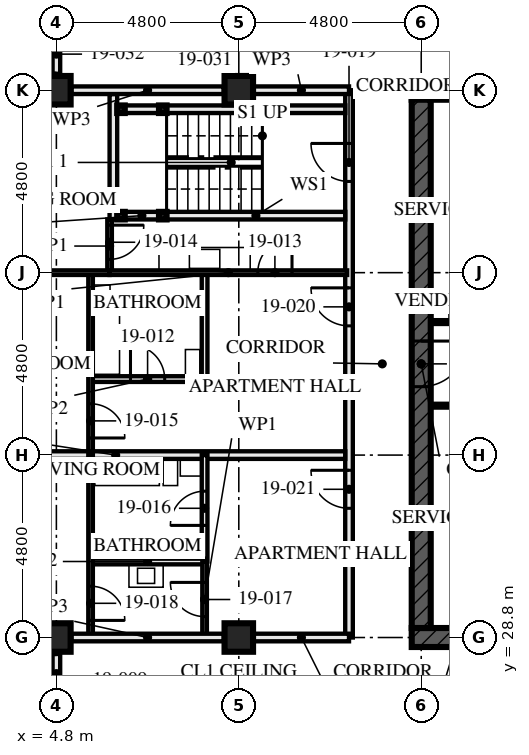
"""IFC4 building model, lengths in metres.
Left out: names, types, materials, properties, quantities, classifications, styles, units other than length and angle.
Written with IfcOpenShell. Run it as: python <this file> out.ifc"""

import sys

from ifc_helpers import new_model, si_unit, direction, frame, frame_2d, origin, origin_2d, place, context, subcontext, project, spatial, rectangle, hollow_rectangle, extrude, element, fill, save


model = new_model("IFC4")
c1 = context("Model", 3, precision=1e-05, world=origin(), true_north=direction((0.0, 1.0)))
c2 = subcontext(c1, "Body", "Model", "MODEL_VIEW")
j1 = project(units=[si_unit("LENGTHUNIT", "METRE"), si_unit("PLANEANGLEUNIT", "RADIAN")], contexts=[c1])
p1 = place(None, origin())
s1 = spatial("IfcSite", under=j1, at=p1, CompositionType="ELEMENT")
p2 = place(p1, origin())
s2 = spatial("IfcBuilding", under=s1, at=p2, CompositionType="ELEMENT")
p3 = place(p2, frame((0.0, 0.0, 72.5)))
s3 = spatial("IfcBuildingStorey", under=s2, at=p3, CompositionType="ELEMENT", Elevation=72.5)
for number, where, z_axis, x_axis in (
    (1, (4.8, 28.8, 0.0), (0.0, 0.0, 1.0), (0.0, 1.0, 0.0)),
    (2, (4.8, 43.2, 0.0), (0.0, 0.0, 1.0), (0.0, 1.0, 0.0)),
    (3, (9.6, 28.8, 0.0), (0.0, 0.0, 1.0), (0.0, 1.0, 0.0)),
    (4, (9.6, 43.2, 0.0), (0.0, 0.0, 1.0), (0.0, 1.0, 0.0)),
):
    element("IfcColumn", number, at=place(p3, frame(where, z_axis=z_axis, x_axis=x_axis)), inside=s3, PredefinedType="COLUMN", context=c2, shape_type="SweptSolid", body=[
        extrude(hollow_rectangle(XDim=0.75, YDim=0.75, WallThickness=0.08, at=origin_2d()), origin(), (0.0, 0.0, 1.0), 3.5),
    ])
p4 = place(p3, frame((14.15, 28.8, -0.17), z_axis=(0.0, 0.0, 1.0), x_axis=(1.0, 0.0, 0.0)))
e5 = element("IfcWall", 5, at=p4, inside=s3, PredefinedType="SHEAR", context=c2, shape_type="SweptSolid", body=[
    extrude(rectangle(XDim=14.9, YDim=0.5, at=frame_2d((7.45, 0.0))), origin(), (0.0, 0.0, 1.0), 3.5),
])
p5 = place(p4, frame((6.85, 0.0, 0.17)))
e6 = element("IfcOpeningElement", 6, at=p5, cuts=e5, PredefinedType="OPENING", context=c2, shape_type="SweptSolid", body=[
    extrude(rectangle(XDim=1.2, YDim=2.1, at=frame_2d((0.6, 1.05))), frame((0.0, 0.26, 0.0), z_axis=(0.0, -1.0, 0.0), x_axis=(1.0, 0.0, 0.0)), (0.0, 0.0, 1.0), 0.521),
])
p6 = place(p3, frame((29.05, 43.2, -0.17), z_axis=(0.0, 0.0, 1.0), x_axis=(-1.0, 0.0, 0.0)))
e7 = element("IfcWall", 7, at=p6, inside=s3, PredefinedType="SHEAR", context=c2, shape_type="SweptSolid", body=[
    extrude(rectangle(XDim=14.9, YDim=0.5, at=frame_2d((7.45, 0.0))), origin(), (0.0, 0.0, 1.0), 3.5),
])
p7 = place(p6, frame((6.85, 0.0, 0.17)))
e8 = element("IfcOpeningElement", 8, at=p7, cuts=e7, PredefinedType="OPENING", context=c2, shape_type="SweptSolid", body=[
    extrude(rectangle(XDim=1.2, YDim=2.1, at=frame_2d((0.6, 1.05))), frame((0.0, 0.26, 0.0), z_axis=(0.0, -1.0, 0.0), x_axis=(1.0, 0.0, 0.0)), (0.0, 0.0, 1.0), 0.521),
])
p8 = place(p3, frame((14.4, 42.95, -0.17), z_axis=(0.0, 0.0, 1.0), x_axis=(0.0, -1.0, 0.0)))
e9 = element("IfcWall", 9, at=p8, inside=s3, PredefinedType="SHEAR", context=c2, shape_type="SweptSolid", body=[
    extrude(rectangle(XDim=13.9, YDim=0.5, at=frame_2d((6.95, 0.0))), origin(), (0.0, 0.0, 1.0), 3.5),
])
p9 = place(p8, frame((6.35, 0.0, 0.17)))
e10 = element("IfcOpeningElement", 10, at=p9, cuts=e9, PredefinedType="OPENING", context=c2, shape_type="SweptSolid", body=[
    extrude(rectangle(XDim=1.2, YDim=2.1, at=frame_2d((0.6, 1.05))), frame((0.0, 0.26, 0.0), z_axis=(0.0, -1.0, 0.0), x_axis=(1.0, 0.0, 0.0)), (0.0, 0.0, 1.0), 0.521),
])
for number, where, z_axis, x_axis in (
    (11, (6.5, 42.7, 0.0), (0.0, 0.0, 1.0), (1.0, 0.0, 0.0)),
    (12, (6.5, 39.9, 0.0), (0.0, 0.0, 1.0), (1.0, 0.0, 0.0)),
    (13, (7.6, 42.7, 0.0), (0.0, 0.0, 1.0), (1.0, 0.0, 0.0)),
    (14, (7.6, 39.9, 0.0), (0.0, 0.0, 1.0), (1.0, 0.0, 0.0)),
):
    element("IfcColumn", number, at=place(p3, frame(where, z_axis=z_axis, x_axis=x_axis)), inside=s3, PredefinedType="COLUMN", context=c2, shape_type="SweptSolid", body=[
        extrude(hollow_rectangle(XDim=0.2, YDim=0.2, WallThickness=0.008, at=origin_2d()), origin(), (0.0, 0.0, 1.0), 3.33),
    ])
p10 = place(p3, frame((4.8, 26.8, 0.0), z_axis=(0.0, 0.0, 1.0), x_axis=(0.0, 1.0, 0.0)))
e15 = element("IfcWall", 15, at=p10, inside=s3, PredefinedType="PARTITIONING", context=c2, shape_type="SweptSolid", body=[
    extrude(rectangle(XDim=1.605, YDim=0.2, at=frame_2d((0.802, 0.0))), origin(), (0.0, 0.0, 1.0), 3.33),
])
p11 = place(p10, frame((0.55, 0.0, 0.0)))
e16 = element("IfcOpeningElement", 16, at=p11, cuts=e15, PredefinedType="OPENING", context=c2, shape_type="SweptSolid", body=[
    extrude(rectangle(XDim=1.0, YDim=2.1, at=frame_2d((0.5, 1.05))), frame((0.0, 0.111, 0.0), z_axis=(0.0, -1.0, 0.0), x_axis=(1.0, 0.0, 0.0)), (0.0, 0.0, 1.0), 0.221),
])
p12 = place(p3, frame((6.6, 42.7, 0.0), z_axis=(0.0, 0.0, 1.0), x_axis=(1.0, 0.0, 0.0)))
e17 = element("IfcWall", 17, at=p12, inside=s3, PredefinedType="SOLIDWALL", context=c2, shape_type="SweptSolid", body=[
    extrude(rectangle(XDim=0.9, YDim=0.2, at=frame_2d((0.45, 0.0))), origin(), (0.0, 0.0, 1.0), 2.99),
])
p13 = place(p3, frame((7.7, 42.7, 0.0), z_axis=(0.0, 0.0, 1.0), x_axis=(1.0, 0.0, 0.0)))
e18 = element("IfcWall", 18, at=p13, inside=s3, PredefinedType="SOLIDWALL", context=c2, shape_type="SweptSolid", body=[
    extrude(rectangle(XDim=4.7, YDim=0.2, at=frame_2d((2.35, 0.0))), origin(), (0.0, 0.0, 1.0), 2.99),
])
p14 = place(p3, frame((6.6, 39.9, 0.0), z_axis=(0.0, 0.0, 1.0), x_axis=(1.0, 0.0, 0.0)))
e19 = element("IfcWall", 19, at=p14, inside=s3, PredefinedType="SOLIDWALL", context=c2, shape_type="SweptSolid", body=[
    extrude(rectangle(XDim=0.9, YDim=0.2, at=frame_2d((0.45, 0.0))), origin(), (0.0, 0.0, 1.0), 2.99),
])
p15 = place(p3, frame((7.7, 39.9, 0.0), z_axis=(0.0, 0.0, 1.0), x_axis=(1.0, 0.0, 0.0)))
e20 = element("IfcWall", 20, at=p15, inside=s3, PredefinedType="SOLIDWALL", context=c2, shape_type="SweptSolid", body=[
    extrude(rectangle(XDim=4.7, YDim=0.2, at=frame_2d((2.35, 0.0))), origin(), (0.0, 0.0, 1.0), 2.99),
])
p16 = place(p3, frame((6.3, 43.1, 0.0), z_axis=(0.0, 0.0, 1.0), x_axis=(0.0, -1.0, 0.0)))
e21 = element("IfcWall", 21, at=p16, inside=s3, PredefinedType="SOLIDWALL", context=c2, shape_type="SweptSolid", body=[
    extrude(rectangle(XDim=3.3, YDim=0.2, at=frame_2d((1.65, 0.0))), origin(), (0.0, 0.0, 1.0), 3.33),
])
p17 = place(p3, frame((5.7, 35.6, 0.0), z_axis=(0.0, 0.0, 1.0), x_axis=(1.0, 0.0, 0.0)))
e22 = element("IfcWall", 22, at=p17, inside=s3, PredefinedType="PARTITIONING", context=c2, shape_type="SweptSolid", body=[
    extrude(rectangle(XDim=3.0, YDim=0.15, at=frame_2d((1.5, 0.0))), origin(), (0.0, 0.0, 1.0), 3.33),
])
p18 = place(p17, frame((1.05, 0.0, 0.0)))
e23 = element("IfcOpeningElement", 23, at=p18, cuts=e22, PredefinedType="OPENING", context=c2, shape_type="SweptSolid", body=[
    extrude(rectangle(XDim=0.9, YDim=2.1, at=frame_2d((0.45, 1.05))), frame((0.0, 0.085, 0.0), z_axis=(0.0, -1.0, 0.0), x_axis=(1.0, 0.0, 0.0)), (0.0, 0.0, 1.0), 0.171),
])
p19 = place(p3, frame((8.7, 38.4, 0.0), z_axis=(0.0, 0.0, 1.0), x_axis=(0.0, -1.0, 0.0)))
e24 = element("IfcWall", 24, at=p19, inside=s3, PredefinedType="PARTITIONING", context=c2, shape_type="SweptSolid", body=[
    extrude(rectangle(XDim=2.8, YDim=0.15, at=frame_2d((1.4, 0.0))), origin(), (0.0, 0.0, 1.0), 3.33),
])
p20 = place(p3, frame((6.2, 38.4, 0.0), z_axis=(0.0, 0.0, 1.0), x_axis=(1.0, 0.0, 0.0)))
e25 = element("IfcWall", 25, at=p20, inside=s3, PredefinedType="PARTITIONING", context=c2, shape_type="SweptSolid", body=[
    extrude(rectangle(XDim=6.25, YDim=0.12, at=frame_2d((3.125, 0.0))), origin(), (0.0, 0.0, 1.0), 2.55),
])
p21 = place(p20, frame((3.9, 0.0, 0.0)))
e26 = element("IfcOpeningElement", 26, at=p21, cuts=e25, PredefinedType="OPENING", context=c2, shape_type="SweptSolid", body=[
    extrude(rectangle(XDim=0.9, YDim=2.1, at=frame_2d((0.45, 1.05))), frame((0.0, 0.071, 0.0), z_axis=(0.0, -1.0, 0.0), x_axis=(1.0, 0.0, 0.0)), (0.0, 0.0, 1.0), 0.141),
])
p22 = place(p3, frame((6.2, 39.8, 0.0), z_axis=(0.0, 0.0, 1.0), x_axis=(0.0, -1.0, 0.0)))
e27 = element("IfcWall", 27, at=p22, inside=s3, PredefinedType="PARTITIONING", context=c2, shape_type="SweptSolid", body=[
    extrude(rectangle(XDim=1.4, YDim=0.12, at=frame_2d((0.7, 0.0))), origin(), (0.0, 0.0, 1.0), 3.33),
])
p23 = place(p22, frame((0.15, 0.0, 0.0)))
e28 = element("IfcOpeningElement", 28, at=p23, cuts=e27, PredefinedType="OPENING", context=c2, shape_type="SweptSolid", body=[
    extrude(rectangle(XDim=0.9, YDim=2.1, at=frame_2d((0.45, 1.05))), frame((0.0, 0.071, 0.0), z_axis=(0.0, -1.0, 0.0), x_axis=(1.0, 0.0, 0.0)), (0.0, 0.0, 1.0), 0.141),
])
p24 = place(p3, frame((5.7, 38.4, 0.0), z_axis=(0.0, 0.0, 1.0), x_axis=(0.0, -1.0, 0.0)))
e29 = element("IfcWall", 29, at=p24, inside=s3, PredefinedType="PARTITIONING", context=c2, shape_type="SweptSolid", body=[
    extrude(rectangle(XDim=4.8, YDim=0.12, at=frame_2d((2.4, 0.0))), origin(), (0.0, 0.0, 1.0), 3.33),
])
p25 = place(p24, frame((3.45, 0.0, 0.0)))
e30 = element("IfcOpeningElement", 30, at=p25, cuts=e29, PredefinedType="OPENING", context=c2, shape_type="SweptSolid", body=[
    extrude(rectangle(XDim=0.9, YDim=2.1, at=frame_2d((0.45, 1.05))), frame((0.0, 0.071, 0.0), z_axis=(0.0, -1.0, 0.0), x_axis=(1.0, 0.0, 0.0)), (0.0, 0.0, 1.0), 0.141),
])
p26 = place(p3, frame((0.32, 38.4, 0.0), z_axis=(0.0, 0.0, 1.0), x_axis=(1.0, 0.0, 0.0)))
e31 = element("IfcWall", 31, at=p26, inside=s3, PredefinedType="PARTITIONING", context=c2, shape_type="SweptSolid", body=[
    extrude(rectangle(XDim=5.88, YDim=0.12, at=frame_2d((2.94, 0.0))), origin(), (0.0, 0.0, 1.0), 2.55),
])
p27 = place(p3, frame((0.32, 33.6, 0.0), z_axis=(0.0, 0.0, 1.0), x_axis=(1.0, 0.0, 0.0)))
e32 = element("IfcWall", 32, at=p27, inside=s3, PredefinedType="PARTITIONING", context=c2, shape_type="SweptSolid", body=[
    extrude(rectangle(XDim=12.08, YDim=0.2, at=frame_2d((6.04, 0.0))), origin(), (0.0, 0.0, 1.0), 2.55),
])
p28 = place(p3, frame((5.7, 30.8, 0.0), z_axis=(0.0, 0.0, 1.0), x_axis=(1.0, 0.0, 0.0)))
e33 = element("IfcWall", 33, at=p28, inside=s3, PredefinedType="PARTITIONING", context=c2, shape_type="SweptSolid", body=[
    extrude(rectangle(XDim=3.0, YDim=0.15, at=frame_2d((1.5, 0.0))), origin(), (0.0, 0.0, 1.0), 3.33),
])
p29 = place(p3, frame((8.7, 33.6, 0.0), z_axis=(0.0, 0.0, 1.0), x_axis=(0.0, -1.0, 0.0)))
e34 = element("IfcWall", 34, at=p29, inside=s3, PredefinedType="PARTITIONING", context=c2, shape_type="SweptSolid", body=[
    extrude(rectangle(XDim=2.8, YDim=0.15, at=frame_2d((1.4, 0.0))), origin(), (0.0, 0.0, 1.0), 3.33),
])
p30 = place(p29, frame((0.95, 0.0, 0.0)))
e35 = element("IfcOpeningElement", 35, at=p30, cuts=e34, PredefinedType="OPENING", context=c2, shape_type="SweptSolid", body=[
    extrude(rectangle(XDim=0.9, YDim=2.1, at=frame_2d((0.45, 1.05))), frame((0.0, 0.085, 0.0), z_axis=(0.0, -1.0, 0.0), x_axis=(1.0, 0.0, 0.0)), (0.0, 0.0, 1.0), 0.171),
])
p31 = place(p3, frame((8.7, 30.8, 0.0), z_axis=(0.0, 0.0, 1.0), x_axis=(0.0, -1.0, 0.0)))
e36 = element("IfcWall", 36, at=p31, inside=s3, PredefinedType="PARTITIONING", context=c2, shape_type="SweptSolid", body=[
    extrude(rectangle(XDim=2.0, YDim=0.12, at=frame_2d((1.0, 0.0))), origin(), (0.0, 0.0, 1.0), 3.33),
])
p32 = place(p31, frame((0.55, 0.0, 0.0)))
e37 = element("IfcOpeningElement", 37, at=p32, cuts=e36, PredefinedType="OPENING", context=c2, shape_type="SweptSolid", body=[
    extrude(rectangle(XDim=0.9, YDim=2.1, at=frame_2d((0.45, 1.05))), frame((0.0, 0.071, 0.0), z_axis=(0.0, -1.0, 0.0), x_axis=(1.0, 0.0, 0.0)), (0.0, 0.0, 1.0), 0.141),
])
p33 = place(p3, frame((5.7, 33.6, 0.0), z_axis=(0.0, 0.0, 1.0), x_axis=(0.0, -1.0, 0.0)))
e38 = element("IfcWall", 38, at=p33, inside=s3, PredefinedType="PARTITIONING", context=c2, shape_type="SweptSolid", body=[
    extrude(rectangle(XDim=4.8, YDim=0.12, at=frame_2d((2.4, 0.0))), origin(), (0.0, 0.0, 1.0), 3.33),
])
p34 = place(p33, frame((3.45, 0.0, 0.0)))
e39 = element("IfcOpeningElement", 39, at=p34, cuts=e38, PredefinedType="OPENING", context=c2, shape_type="SweptSolid", body=[
    extrude(rectangle(XDim=0.9, YDim=2.1, at=frame_2d((0.45, 1.05))), frame((0.0, 0.071, 0.0), z_axis=(0.0, -1.0, 0.0), x_axis=(1.0, 0.0, 0.0)), (0.0, 0.0, 1.0), 0.141),
])
p35 = place(p3, frame((12.5, 43.2, 0.0), z_axis=(0.0, 0.0, 1.0), x_axis=(0.0, -1.0, 0.0)))
e40 = element("IfcWall", 40, at=p35, inside=s3, PredefinedType="PARTITIONING", context=c2, shape_type="SweptSolid", body=[
    extrude(rectangle(XDim=14.4, YDim=0.2, at=frame_2d((7.2, 0.0))), origin(), (0.0, 0.0, 1.0), 2.55),
])
p36 = place(p35, frame((1.4, 0.0, 0.0)))
e41 = element("IfcOpeningElement", 41, at=p36, cuts=e40, PredefinedType="OPENING", context=c2, shape_type="SweptSolid", body=[
    extrude(rectangle(XDim=1.0, YDim=2.1, at=frame_2d((0.5, 1.05))), frame((0.0, 0.111, 0.0), z_axis=(0.0, -1.0, 0.0), x_axis=(1.0, 0.0, 0.0)), (0.0, 0.0, 1.0), 0.221),
])
p37 = place(p35, frame((5.2, 0.0, 0.0)))
e42 = element("IfcOpeningElement", 42, at=p37, cuts=e40, PredefinedType="OPENING", context=c2, shape_type="SweptSolid", body=[
    extrude(rectangle(XDim=1.0, YDim=2.1, at=frame_2d((0.5, 1.05))), frame((0.0, 0.111, 0.0), z_axis=(0.0, -1.0, 0.0), x_axis=(1.0, 0.0, 0.0)), (0.0, 0.0, 1.0), 0.221),
])
p38 = place(p35, frame((10.0, 0.0, 0.0)))
e43 = element("IfcOpeningElement", 43, at=p38, cuts=e40, PredefinedType="OPENING", context=c2, shape_type="SweptSolid", body=[
    extrude(rectangle(XDim=1.0, YDim=2.1, at=frame_2d((0.5, 1.05))), frame((0.0, 0.111, 0.0), z_axis=(0.0, -1.0, 0.0), x_axis=(1.0, 0.0, 0.0)), (0.0, 0.0, 1.0), 0.221),
])
p39 = place(p3, frame((4.8, 45.2, 0.0), z_axis=(0.0, 0.0, 1.0), x_axis=(0.0, -1.0, 0.0)))
e44 = element("IfcWall", 44, at=p39, inside=s3, PredefinedType="PARTITIONING", context=c2, shape_type="SweptSolid", body=[
    extrude(rectangle(XDim=1.605, YDim=0.2, at=frame_2d((0.802, 0.0))), origin(), (0.0, 0.0, 1.0), 3.33),
])
p40 = place(p39, frame((0.55, 0.0, 0.0)))
e45 = element("IfcOpeningElement", 45, at=p40, cuts=e44, PredefinedType="OPENING", context=c2, shape_type="SweptSolid", body=[
    extrude(rectangle(XDim=1.0, YDim=2.1, at=frame_2d((0.5, 1.05))), frame((0.0, 0.111, 0.0), z_axis=(0.0, -1.0, 0.0), x_axis=(1.0, 0.0, 0.0)), (0.0, 0.0, 1.0), 0.221),
])
p41 = place(p3, frame((14.65, 34.9, 0.0), z_axis=(0.0, 0.0, 1.0), x_axis=(1.0, 0.0, 0.0)))
e46 = element("IfcWall", 46, at=p41, inside=s3, PredefinedType="SOLIDWALL", context=c2, shape_type="SweptSolid", body=[
    extrude(rectangle(XDim=5.9, YDim=0.1, at=frame_2d((2.95, 0.0))), origin(), (0.0, 0.0, 1.0), 3.33),
])
p42 = place(p41, frame((1.6, 0.0, 0.0)))
e47 = element("IfcOpeningElement", 47, at=p42, cuts=e46, PredefinedType="OPENING", context=c2, shape_type="SweptSolid", body=[
    extrude(rectangle(XDim=0.7, YDim=2.1, at=frame_2d((0.35, 1.05))), frame((0.0, 0.061, 0.0), z_axis=(0.0, -1.0, 0.0), x_axis=(1.0, 0.0, 0.0)), (0.0, 0.0, 1.0), 0.121),
])
p43 = place(p3, frame((14.65, 37.1, 0.0), z_axis=(0.0, 0.0, 1.0), x_axis=(1.0, 0.0, 0.0)))
e48 = element("IfcWall", 48, at=p43, inside=s3, PredefinedType="SOLIDWALL", context=c2, shape_type="SweptSolid", body=[
    extrude(rectangle(XDim=5.9, YDim=0.1, at=frame_2d((2.95, 0.0))), origin(), (0.0, 0.0, 1.0), 3.33),
])
p44 = place(p43, frame((0.5, 0.0, 0.0)))
e49 = element("IfcOpeningElement", 49, at=p44, cuts=e48, PredefinedType="OPENING", context=c2, shape_type="SweptSolid", body=[
    extrude(rectangle(XDim=0.7, YDim=2.1, at=frame_2d((0.35, 1.05))), frame((0.0, 0.061, 0.0), z_axis=(0.0, -1.0, 0.0), x_axis=(1.0, 0.0, 0.0)), (0.0, 0.0, 1.0), 0.121),
])
p45 = place(p43, frame((1.85, 0.0, 0.0)))
e50 = element("IfcOpeningElement", 50, at=p45, cuts=e48, PredefinedType="OPENING", context=c2, shape_type="SweptSolid", body=[
    extrude(rectangle(XDim=0.9, YDim=2.1, at=frame_2d((0.45, 1.05))), frame((0.0, 0.061, 0.0), z_axis=(0.0, -1.0, 0.0), x_axis=(1.0, 0.0, 0.0)), (0.0, 0.0, 1.0), 0.121),
])
p46 = place(p3, frame((12.5, 28.8, 0.0), z_axis=(0.0, 0.0, 1.0), x_axis=(-1.0, 0.0, 0.0)))
e51 = element("IfcWall", 51, at=p46, inside=s3, PredefinedType="PARTITIONING", context=c2, shape_type="SweptSolid", body=[
    extrude(rectangle(XDim=2.505, YDim=0.2, at=frame_2d((1.252, 0.0))), origin(), (0.0, 0.0, 1.0), 2.32),
])
p47 = place(p3, frame((9.205, 28.8, 0.0), z_axis=(0.0, 0.0, 1.0), x_axis=(-1.0, 0.0, 0.0)))
e52 = element("IfcWall", 52, at=p47, inside=s3, PredefinedType="PARTITIONING", context=c2, shape_type="SweptSolid", body=[
    extrude(rectangle(XDim=4.01, YDim=0.2, at=frame_2d((2.005, 0.0))), origin(), (0.0, 0.0, 1.0), 2.32),
])
p48 = place(p3, frame((12.5, 43.2, 0.0), z_axis=(0.0, 0.0, 1.0), x_axis=(-1.0, 0.0, 0.0)))
e53 = element("IfcWall", 53, at=p48, inside=s3, PredefinedType="PARTITIONING", context=c2, shape_type="SweptSolid", body=[
    extrude(rectangle(XDim=2.505, YDim=0.2, at=frame_2d((1.252, 0.0))), origin(), (0.0, 0.0, 1.0), 2.32),
])
p49 = place(p3, frame((9.205, 43.2, 0.0), z_axis=(0.0, 0.0, 1.0), x_axis=(-1.0, 0.0, 0.0)))
e54 = element("IfcWall", 54, at=p49, inside=s3, PredefinedType="PARTITIONING", context=c2, shape_type="SweptSolid", body=[
    extrude(rectangle(XDim=4.01, YDim=0.2, at=frame_2d((2.005, 0.0))), origin(), (0.0, 0.0, 1.0), 2.32),
])
p50 = place(p11, origin())
e55 = element("IfcDoor", 55, at=p50, inside=s3, OperationType="SINGLE_SWING_LEFT", PredefinedType="DOOR", context=c2, shape_type="SweptSolid", body=[
    extrude(rectangle(XDim=1.0, YDim=2.1, at=frame_2d((0.5, 1.05))), frame((0.0, 0.027, 0.0), z_axis=(0.0, -1.0, 0.0), x_axis=(1.0, 0.0, 0.0)), (0.0, 0.0, 1.0), 0.054),
])
fill(e16, e55)
p51 = place(p18, origin())
e56 = element("IfcDoor", 56, at=p51, inside=s3, OperationType="SINGLE_SWING_RIGHT", PredefinedType="DOOR", context=c2, shape_type="SweptSolid", body=[
    extrude(rectangle(XDim=0.9, YDim=2.1, at=frame_2d((0.45, 1.05))), frame((0.0, 0.022, 0.0), z_axis=(0.0, -1.0, 0.0), x_axis=(1.0, 0.0, 0.0)), (0.0, 0.0, 1.0), 0.044),
])
fill(e23, e56)
p52 = place(p21, origin())
e57 = element("IfcDoor", 57, at=p52, inside=s3, OperationType="SINGLE_SWING_LEFT", PredefinedType="DOOR", context=c2, shape_type="SweptSolid", body=[
    extrude(rectangle(XDim=0.9, YDim=2.1, at=frame_2d((0.45, 1.05))), frame((0.0, 0.022, 0.0), z_axis=(0.0, -1.0, 0.0), x_axis=(1.0, 0.0, 0.0)), (0.0, 0.0, 1.0), 0.044),
])
fill(e26, e57)
p53 = place(p23, origin())
e58 = element("IfcDoor", 58, at=p53, inside=s3, OperationType="SINGLE_SWING_RIGHT", PredefinedType="DOOR", context=c2, shape_type="SweptSolid", body=[
    extrude(rectangle(XDim=0.9, YDim=2.1, at=frame_2d((0.45, 1.05))), frame((0.0, 0.022, 0.0), z_axis=(0.0, -1.0, 0.0), x_axis=(1.0, 0.0, 0.0)), (0.0, 0.0, 1.0), 0.044),
])
fill(e28, e58)
p54 = place(p25, origin())
e59 = element("IfcDoor", 59, at=p54, inside=s3, OperationType="SINGLE_SWING_LEFT", PredefinedType="DOOR", context=c2, shape_type="SweptSolid", body=[
    extrude(rectangle(XDim=0.9, YDim=2.1, at=frame_2d((0.45, 1.05))), frame((0.0, 0.022, 0.0), z_axis=(0.0, -1.0, 0.0), x_axis=(1.0, 0.0, 0.0)), (0.0, 0.0, 1.0), 0.044),
])
fill(e30, e59)
p55 = place(p30, frame((0.9, 0.0, 0.0), z_axis=(0.0, 0.0, 1.0), x_axis=(-1.0, 0.0, 0.0)))
e60 = element("IfcDoor", 60, at=p55, inside=s3, OperationType="SINGLE_SWING_RIGHT", PredefinedType="DOOR", context=c2, shape_type="SweptSolid", body=[
    extrude(rectangle(XDim=0.9, YDim=2.1, at=frame_2d((0.45, 1.05))), frame((0.0, 0.022, 0.0), z_axis=(0.0, -1.0, 0.0), x_axis=(1.0, 0.0, 0.0)), (0.0, 0.0, 1.0), 0.044),
])
fill(e35, e60)
p56 = place(p32, frame((0.9, 0.0, 0.0), z_axis=(0.0, 0.0, 1.0), x_axis=(-1.0, 0.0, 0.0)))
e61 = element("IfcDoor", 61, at=p56, inside=s3, OperationType="SINGLE_SWING_LEFT", PredefinedType="DOOR", context=c2, shape_type="SweptSolid", body=[
    extrude(rectangle(XDim=0.9, YDim=2.1, at=frame_2d((0.45, 1.05))), frame((0.0, 0.022, 0.0), z_axis=(0.0, -1.0, 0.0), x_axis=(1.0, 0.0, 0.0)), (0.0, 0.0, 1.0), 0.044),
])
fill(e37, e61)
p57 = place(p34, origin())
e62 = element("IfcDoor", 62, at=p57, inside=s3, OperationType="SINGLE_SWING_LEFT", PredefinedType="DOOR", context=c2, shape_type="SweptSolid", body=[
    extrude(rectangle(XDim=0.9, YDim=2.1, at=frame_2d((0.45, 1.05))), frame((0.0, 0.022, 0.0), z_axis=(0.0, -1.0, 0.0), x_axis=(1.0, 0.0, 0.0)), (0.0, 0.0, 1.0), 0.044),
])
fill(e39, e62)
p58 = place(p36, frame((1.0, 0.0, 0.0), z_axis=(0.0, 0.0, 1.0), x_axis=(-1.0, 0.0, 0.0)))
e63 = element("IfcDoor", 63, at=p58, inside=s3, OperationType="SINGLE_SWING_LEFT", PredefinedType="DOOR", context=c2, shape_type="SweptSolid", body=[
    extrude(rectangle(XDim=1.0, YDim=2.1, at=frame_2d((0.5, 1.05))), frame((0.0, 0.032, 0.0), z_axis=(0.0, -1.0, 0.0), x_axis=(1.0, 0.0, 0.0)), (0.0, 0.0, 1.0), 0.064),
])
fill(e41, e63)
p59 = place(p37, frame((1.0, 0.0, 0.0), z_axis=(0.0, 0.0, 1.0), x_axis=(-1.0, 0.0, 0.0)))
e64 = element("IfcDoor", 64, at=p59, inside=s3, OperationType="SINGLE_SWING_LEFT", PredefinedType="DOOR", context=c2, shape_type="SweptSolid", body=[
    extrude(rectangle(XDim=1.0, YDim=2.1, at=frame_2d((0.5, 1.05))), frame((0.0, 0.027, 0.0), z_axis=(0.0, -1.0, 0.0), x_axis=(1.0, 0.0, 0.0)), (0.0, 0.0, 1.0), 0.054),
])
fill(e42, e64)
p60 = place(p38, frame((1.0, 0.0, 0.0), z_axis=(0.0, 0.0, 1.0), x_axis=(-1.0, 0.0, 0.0)))
e65 = element("IfcDoor", 65, at=p60, inside=s3, OperationType="SINGLE_SWING_LEFT", PredefinedType="DOOR", context=c2, shape_type="SweptSolid", body=[
    extrude(rectangle(XDim=1.0, YDim=2.1, at=frame_2d((0.5, 1.05))), frame((0.0, 0.027, 0.0), z_axis=(0.0, -1.0, 0.0), x_axis=(1.0, 0.0, 0.0)), (0.0, 0.0, 1.0), 0.054),
])
fill(e43, e65)
p61 = place(p40, frame((1.0, 0.0, 0.0), z_axis=(0.0, 0.0, 1.0), x_axis=(-1.0, 0.0, 0.0)))
e66 = element("IfcDoor", 66, at=p61, inside=s3, OperationType="SINGLE_SWING_RIGHT", PredefinedType="DOOR", context=c2, shape_type="SweptSolid", body=[
    extrude(rectangle(XDim=1.0, YDim=2.1, at=frame_2d((0.5, 1.05))), frame((0.0, 0.027, 0.0), z_axis=(0.0, -1.0, 0.0), x_axis=(1.0, 0.0, 0.0)), (0.0, 0.0, 1.0), 0.054),
])
fill(e45, e66)
p62 = place(p9, origin())
e67 = element("IfcDoor", 67, at=p62, inside=s3, OperationType="SINGLE_SWING_LEFT", PredefinedType="DOOR", context=c2, shape_type="SweptSolid", body=[
    extrude(rectangle(XDim=1.2, YDim=2.1, at=frame_2d((0.6, 1.05))), frame((0.0, 0.027, 0.0), z_axis=(0.0, -1.0, 0.0), x_axis=(1.0, 0.0, 0.0)), (0.0, 0.0, 1.0), 0.054),
])
fill(e10, e67)
save(model, sys.argv[1])
